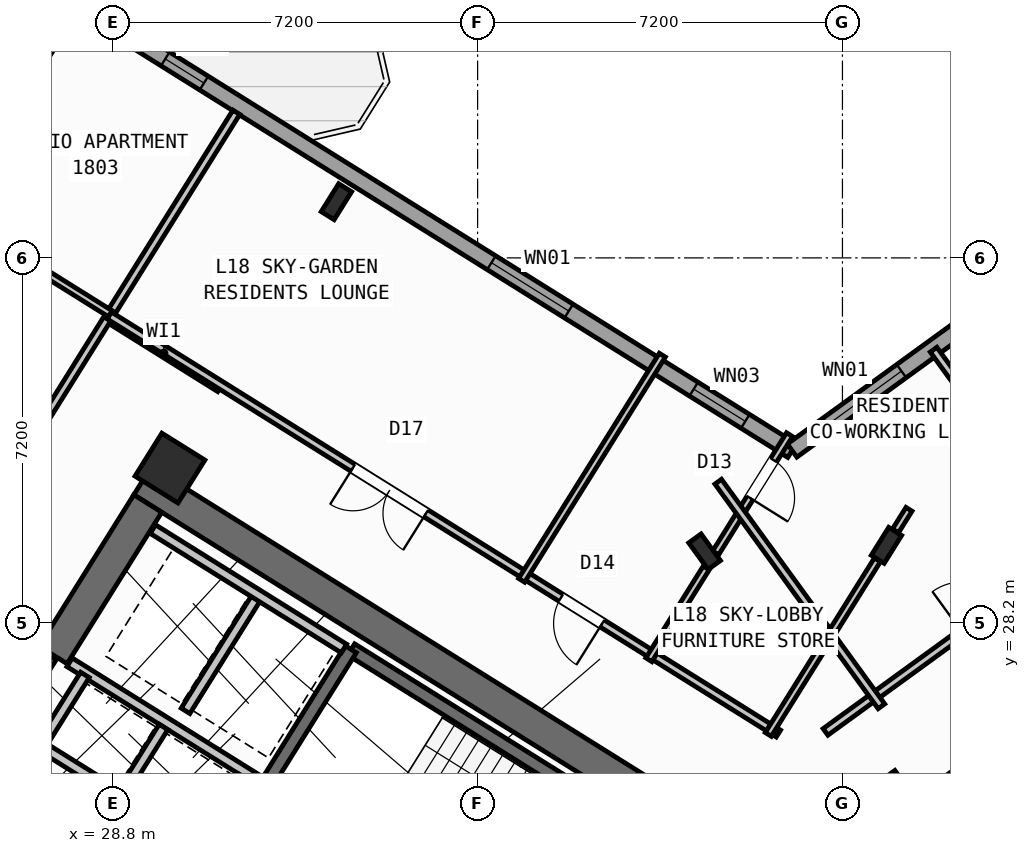
"""IFC4 building model, lengths in metres.
Left out: names, types, materials, properties, quantities, classifications, styles, units other than length and angle.
Written with IfcOpenShell. Run it as: python <this file> out.ifc"""

import sys

from ifc_helpers import new_model, si_unit, direction, frame, frame_2d, origin, origin_2d, place, context, subcontext, project, spatial, rectangle, hollow_rectangle, i_section, extrude, source, transform, mapped, element, fill, save


model = new_model("IFC4")
c1 = context("Model", 3, precision=1e-05, world=origin(), true_north=direction((0.0, 1.0)))
c2 = subcontext(c1, "Body", "Model", "MODEL_VIEW")
j1 = project(units=[si_unit("LENGTHUNIT", "METRE"), si_unit("PLANEANGLEUNIT", "RADIAN")], contexts=[c1])
p1 = place(None, origin())
s1 = spatial("IfcSite", under=j1, at=p1, CompositionType="ELEMENT")
p2 = place(p1, origin())
s2 = spatial("IfcBuilding", under=s1, at=p2, CompositionType="ELEMENT")
p3 = place(p2, frame((0.0, 0.0, 71.7)))
s3 = spatial("IfcBuildingStorey", under=s2, at=p3, CompositionType="ELEMENT", Elevation=71.7)
p4 = place(p3, frame((40.615, 23.983, 0.0), z_axis=(0.0, 0.0, 1.0), x_axis=(-0.848045953968, 0.529922692436, 0.0)))
e1 = element("IfcWall", 1, at=p4, inside=s3, PredefinedType="SHEAR", context=c2, shape_type="SweptSolid", body=[
    extrude(rectangle(XDim=13.24, YDim=0.65, at=frame_2d((6.62, 0.0))), origin(), (0.0, 0.0, 1.0), 4.52),
])
p5 = place(p3, frame((29.491, 30.552, 0.0), z_axis=(0.0, 0.0, 1.0), x_axis=(-0.529893103397, -0.8480644427, 0.0)))
e2 = element("IfcWall", 2, at=p5, inside=s3, PredefinedType="SHEAR", context=c2, shape_type="SweptSolid", body=[
    extrude(rectangle(XDim=3.525, YDim=0.65, at=frame_2d((1.763, 0.0))), origin(), (0.0, 0.0, 1.0), 4.52),
])
p6 = place(p3, frame((44.325, 24.113, 0.0), z_axis=(0.0, 0.0, 1.0), x_axis=(0.809012664862, 0.58779121131, 0.0)))
e3 = element("IfcWall", 3, at=p6, inside=s3, PredefinedType="SHEAR", context=c2, shape_type="SweptSolid", body=[
    extrude(rectangle(XDim=12.44, YDim=0.65, at=frame_2d((6.22, 0.0))), origin(), (0.0, 0.0, 1.0), 4.52),
])
m1 = source(origin(), c2, "Body", "SweptSolid", [
    extrude(i_section(OverallWidth=0.3, OverallDepth=0.65, WebThickness=0.016, FlangeThickness=0.031, at=origin_2d()), origin(), (0.0, 0.0, 1.0), 4.8),
])
for number, where, z_axis, x_axis in (
    (4, (44.068, 29.726, 0.0), (0.0, 0.0, 1.0), (-0.848, 0.53, 0.0)),
    (5, (33.213, 36.509, 0.0), (0.0, 0.0, 1.0), (-0.848, 0.53, 0.0)),
):
    element("IfcColumn", number, at=place(p3, frame(where, z_axis=z_axis, x_axis=x_axis)), inside=s3, PredefinedType="COLUMN", context=c2, shape_type="MappedRepresentation", body=[
        mapped(m1, transform((0.0, 0.0, 0.0), scale=1.0)),
    ])
m2 = source(origin(), c2, "Body", "SweptSolid", [
    extrude(hollow_rectangle(XDim=1.0, YDim=1.0, WallThickness=0.04, at=origin_2d()), origin(), (0.0, 0.0, 1.0), 4.8),
])
for number, where, z_axis, x_axis in (
    (6, (29.928, 31.251, 0.0), (0.0, 0.0, 1.0), (-0.848, 0.53, 0.0)),
    (7, (44.124, 24.585, 0.0), (0.0, 0.0, 1.0), (0.809, 0.588, 0.0)),
):
    element("IfcColumn", number, at=place(p3, frame(where, z_axis=z_axis, x_axis=x_axis)), inside=s3, PredefinedType="COLUMN", context=c2, shape_type="MappedRepresentation", body=[
        mapped(m2, transform((0.0, 0.0, 0.0), scale=1.0)),
    ])
p7 = place(p3, frame((40.479, 29.601, 0.0), z_axis=(0.0, 0.0, 1.0), x_axis=(0.809016994375, 0.587785252292, 0.0)))
e8 = element("IfcColumn", 8, at=p7, inside=s3, PredefinedType="COLUMN", context=c2, shape_type="MappedRepresentation", body=[
    mapped(m1, transform((0.0, 0.0, 0.0), scale=1.0)),
])
p8 = place(p3, frame((31.76, 12.183, 0.0), z_axis=(0.0, 0.0, 1.0), x_axis=(-0.848047074256, 0.529920899612, 0.0)))
e9 = element("IfcWall", 9, at=p8, inside=s3, PredefinedType="STANDARD", context=c2, shape_type="SweptSolid", body=[
    extrude(rectangle(XDim=30.652, YDim=0.32, at=frame_2d((15.326, 0.0))), origin(), (0.0, 0.0, 1.0), 4.52),
])
p9 = place(p8, frame((20.241, 0.0, 0.0)))
e10 = element("IfcOpeningElement", 10, at=p9, cuts=e9, PredefinedType="OPENING", context=c2, shape_type="SweptSolid", body=[
    extrude(rectangle(XDim=1.2, YDim=2.15, at=frame_2d((0.6, 1.075))), frame((0.0, 0.17, 0.0), z_axis=(0.0, -1.0, 0.0), x_axis=(1.0, 0.0, 0.0)), (0.0, 0.0, 1.0), 0.34),
])
p10 = place(p8, frame((14.781, 0.0, 0.0)))
e11 = element("IfcOpeningElement", 11, at=p10, cuts=e9, PredefinedType="OPENING", context=c2, shape_type="SweptSolid", body=[
    extrude(rectangle(XDim=1.5, YDim=2.25, at=frame_2d((0.75, 1.125))), frame((0.0, 0.17, 0.0), z_axis=(0.0, -1.0, 0.0), x_axis=(1.0, 0.0, 0.0)), (0.0, 0.0, 1.0), 0.34),
])
p11 = place(p8, frame((1.84, 0.0, 0.75)))
e12 = element("IfcOpeningElement", 12, at=p11, cuts=e9, PredefinedType="OPENING", context=c2, shape_type="SweptSolid", body=[
    extrude(rectangle(XDim=2.4, YDim=1.6, at=frame_2d((1.2, 0.8))), frame((0.0, 0.17, 0.0), z_axis=(0.0, -1.0, 0.0), x_axis=(1.0, 0.0, 0.0)), (0.0, 0.0, 1.0), 0.34),
])
p12 = place(p8, frame((7.019, 0.0, 0.75)))
e13 = element("IfcOpeningElement", 13, at=p12, cuts=e9, PredefinedType="OPENING", context=c2, shape_type="SweptSolid", body=[
    extrude(rectangle(XDim=2.4, YDim=1.6, at=frame_2d((1.2, 0.8))), frame((0.0, 0.17, 0.0), z_axis=(0.0, -1.0, 0.0), x_axis=(1.0, 0.0, 0.0)), (0.0, 0.0, 1.0), 0.34),
])
p13 = place(p8, frame((25.841, 0.0, 0.95)))
e14 = element("IfcOpeningElement", 14, at=p13, cuts=e9, PredefinedType="OPENING", context=c2, shape_type="SweptSolid", body=[
    extrude(rectangle(XDim=1.2, YDim=1.4, at=frame_2d((0.6, 0.7))), frame((0.0, 0.17, 0.0), z_axis=(0.0, -1.0, 0.0), x_axis=(1.0, 0.0, 0.0)), (0.0, 0.0, 1.0), 0.34),
])
p14 = place(p3, frame((17.424, 47.083, 0.0), z_axis=(0.0, 0.0, 1.0), x_axis=(0.848049927979, -0.529916332693, 0.0)))
e15 = element("IfcWall", 15, at=p14, inside=s3, PredefinedType="STANDARD", context=c2, shape_type="SweptSolid", body=[
    extrude(rectangle(XDim=29.223, YDim=0.32, at=frame_2d((14.612, 0.0))), origin(), (0.0, 0.0, 1.0), 4.52),
])
p15 = place(p14, frame((3.339, 0.0, 0.0)))
e16 = element("IfcOpeningElement", 16, at=p15, cuts=e15, PredefinedType="OPENING", context=c2, shape_type="SweptSolid", body=[
    extrude(rectangle(XDim=1.05, YDim=2.15, at=frame_2d((0.525, 1.075))), frame((0.0, 0.17, 0.0), z_axis=(0.0, -1.0, 0.0), x_axis=(1.0, 0.0, 0.0)), (0.0, 0.0, 1.0), 0.34),
])
p16 = place(p14, frame((8.194, 0.0, 0.75)))
e17 = element("IfcOpeningElement", 17, at=p16, cuts=e15, PredefinedType="OPENING", context=c2, shape_type="SweptSolid", body=[
    extrude(rectangle(XDim=2.4, YDim=1.6, at=frame_2d((1.2, 0.8))), frame((0.0, 0.17, 0.0), z_axis=(0.0, -1.0, 0.0), x_axis=(1.0, 0.0, 0.0)), (0.0, 0.0, 1.0), 0.34),
])
p17 = place(p14, frame((22.226, 0.0, 0.85)))
e18 = element("IfcOpeningElement", 18, at=p17, cuts=e15, PredefinedType="OPENING", context=c2, shape_type="SweptSolid", body=[
    extrude(rectangle(XDim=1.8, YDim=1.5, at=frame_2d((0.9, 0.75))), frame((0.0, 0.17, 0.0), z_axis=(0.0, -1.0, 0.0), x_axis=(1.0, 0.0, 0.0)), (0.0, 0.0, 1.0), 0.34),
])
p18 = place(p14, frame((26.934, 0.0, 0.95)))
e19 = element("IfcOpeningElement", 19, at=p18, cuts=e15, PredefinedType="OPENING", context=c2, shape_type="SweptSolid", body=[
    extrude(rectangle(XDim=1.2, YDim=1.4, at=frame_2d((0.6, 0.7))), frame((0.0, 0.17, 0.0), z_axis=(0.0, -1.0, 0.0), x_axis=(1.0, 0.0, 0.0)), (0.0, 0.0, 1.0), 0.34),
])
p19 = place(p14, frame((14.636, 0.0, 1.0)))
e20 = element("IfcOpeningElement", 20, at=p19, cuts=e15, PredefinedType="OPENING", context=c2, shape_type="SweptSolid", body=[
    extrude(rectangle(XDim=0.9, YDim=1.25, at=frame_2d((0.45, 0.625))), frame((0.0, 0.17, 0.0), z_axis=(0.0, -1.0, 0.0), x_axis=(1.0, 0.0, 0.0)), (0.0, 0.0, 1.0), 0.34),
])
p20 = place(p3, frame((42.207, 31.597, 0.0), z_axis=(0.0, 0.0, 1.0), x_axis=(0.809020333377, 0.587780656523, 0.0)))
e21 = element("IfcWall", 21, at=p20, inside=s3, PredefinedType="STANDARD", context=c2, shape_type="SweptSolid", body=[
    extrude(rectangle(XDim=15.223, YDim=0.32, at=frame_2d((7.611, 0.0))), origin(), (0.0, 0.0, 1.0), 4.52),
])
p21 = place(p20, frame((12.562, 0.0, 0.0)))
e22 = element("IfcOpeningElement", 22, at=p21, cuts=e21, PredefinedType="OPENING", context=c2, shape_type="SweptSolid", body=[
    extrude(rectangle(XDim=1.05, YDim=2.15, at=frame_2d((0.525, 1.075))), frame((0.0, 0.17, 0.0), z_axis=(0.0, -1.0, 0.0), x_axis=(1.0, 0.0, 0.0)), (0.0, 0.0, 1.0), 0.34),
])
p22 = place(p20, frame((0.868, 0.0, 0.85)))
e23 = element("IfcOpeningElement", 23, at=p22, cuts=e21, PredefinedType="OPENING", context=c2, shape_type="SweptSolid", body=[
    extrude(rectangle(XDim=1.8, YDim=1.5, at=frame_2d((0.9, 0.75))), frame((0.0, 0.17, 0.0), z_axis=(0.0, -1.0, 0.0), x_axis=(1.0, 0.0, 0.0)), (0.0, 0.0, 1.0), 0.34),
])
p23 = place(p20, frame((4.932, 0.0, 0.85)))
e24 = element("IfcOpeningElement", 24, at=p23, cuts=e21, PredefinedType="OPENING", context=c2, shape_type="SweptSolid", body=[
    extrude(rectangle(XDim=1.8, YDim=1.5, at=frame_2d((0.9, 0.75))), frame((0.0, 0.17, 0.0), z_axis=(0.0, -1.0, 0.0), x_axis=(1.0, 0.0, 0.0)), (0.0, 0.0, 1.0), 0.34),
])
p24 = place(p3, frame((39.721, 23.788, 0.0), z_axis=(0.0, 0.0, 1.0), x_axis=(-0.848054434086, 0.529909121291, 0.0)))
e25 = element("IfcWall", 25, at=p24, inside=s3, PredefinedType="SHEAR", context=c2, shape_type="SweptSolid", body=[
    extrude(rectangle(XDim=7.33, YDim=0.26, at=frame_2d((3.665, 0.0))), origin(), (0.0, 0.0, 1.0), 4.52),
])
p25 = place(p3, frame((33.496, 27.677, 0.0), z_axis=(0.0, 0.0, 1.0), x_axis=(-0.529908658664, -0.84805472316, 0.0)))
e26 = element("IfcWall", 26, at=p25, inside=s3, PredefinedType="SHEAR", context=c2, shape_type="SweptSolid", body=[
    extrude(rectangle(XDim=3.16, YDim=0.26, at=frame_2d((1.58, 0.0))), origin(), (0.0, 0.0, 1.0), 4.52),
])
p26 = place(p3, frame((31.822, 24.998, 0.0), z_axis=(0.0, 0.0, 1.0), x_axis=(-0.848058348634, 0.529902856485, 0.0)))
e27 = element("IfcWall", 27, at=p26, inside=s3, PredefinedType="STANDARD", context=c2, shape_type="SweptSolid", body=[
    extrude(rectangle(XDim=4.568, YDim=0.2, at=frame_2d((2.284, 0.0))), origin(), (0.0, 0.0, 1.0), 4.51),
])
p27 = place(p3, frame((32.108, 22.814, 0.0), z_axis=(0.0, 0.0, 1.0), x_axis=(-0.848042229521, 0.529928652696, 0.0)))
e28 = element("IfcWall", 28, at=p27, inside=s3, PredefinedType="STANDARD", context=c2, shape_type="SweptSolid", body=[
    extrude(rectangle(XDim=5.62, YDim=0.2, at=frame_2d((2.81, 0.0))), origin(), (0.0, 0.0, 1.0), 4.51),
])
p28 = place(p3, frame((28.25, 27.17, 0.0), z_axis=(0.0, 0.0, 1.0), x_axis=(-0.529905827651, -0.848056492117, 0.0)))
e29 = element("IfcWall", 29, at=p28, inside=s3, PredefinedType="STANDARD", context=c2, shape_type="SweptSolid", body=[
    extrude(rectangle(XDim=1.65, YDim=0.2, at=frame_2d((0.825, 0.0))), origin(), (0.0, 0.0, 1.0), 4.51),
])
p29 = place(p3, frame((31.645, 28.716, 0.0), z_axis=(0.0, 0.0, 1.0), x_axis=(-0.52986693015, -0.848080795876, 0.0)))
e30 = element("IfcWall", 30, at=p29, inside=s3, PredefinedType="STANDARD", context=c2, shape_type="SweptSolid", body=[
    extrude(rectangle(XDim=2.66, YDim=0.2, at=frame_2d((1.33, 0.0))), origin(), (0.0, 0.0, 1.0), 4.51),
])
p30 = place(p3, frame((33.363, 27.69, 0.0), z_axis=(0.0, 0.0, 1.0), x_axis=(-0.848053806312, 0.529910125964, 0.0)))
e31 = element("IfcWall", 31, at=p30, inside=s3, PredefinedType="STANDARD", context=c2, shape_type="SweptSolid", body=[
    extrude(rectangle(XDim=4.448, YDim=0.2, at=frame_2d((2.224, 0.0))), origin(), (0.0, 0.0, 1.0), 4.51),
])
p31 = place(p3, frame((29.801, 26.142, 0.0), z_axis=(0.0, 0.0, 1.0), x_axis=(-0.529998940003, -0.847998304005, 0.0)))
e32 = element("IfcWall", 32, at=p31, inside=s3, PredefinedType="STANDARD", context=c2, shape_type="SweptSolid", body=[
    extrude(rectangle(XDim=1.58, YDim=0.2, at=frame_2d((0.79, 0.0))), origin(), (0.0, 0.0, 1.0), 4.51),
])
p32 = place(p3, frame((27.596, 27.52, 0.0), z_axis=(0.0, 0.0, 1.0), x_axis=(-0.529865479138, -0.848081702443, 0.0)))
e33 = element("IfcWall", 33, at=p32, inside=s3, PredefinedType="STANDARD", context=c2, shape_type="SweptSolid", body=[
    extrude(rectangle(XDim=2.96, YDim=0.2, at=frame_2d((1.48, 0.0))), origin(), (0.0, 0.0, 1.0), 4.51),
])
p33 = place(p32, frame((1.76, 0.0, 0.0)))
e34 = element("IfcOpeningElement", 34, at=p33, cuts=e33, PredefinedType="OPENING", context=c2, shape_type="SweptSolid", body=[
    extrude(rectangle(XDim=0.86, YDim=2.05, at=frame_2d((0.43, 1.025))), frame((0.0, 0.11, 0.0), z_axis=(0.0, -1.0, 0.0), x_axis=(1.0, 0.0, 0.0)), (0.0, 0.0, 1.0), 0.22),
])
p34 = place(p3, frame((30.914, 32.829, 0.0), z_axis=(0.0, 0.0, 1.0), x_axis=(-0.848008813643, 0.529982124211, 0.0)))
e35 = element("IfcWall", 35, at=p34, inside=s3, PredefinedType="PARTITIONING", context=c2, shape_type="SweptSolid", body=[
    extrude(rectangle(XDim=2.61, YDim=0.16, at=frame_2d((1.305, 0.0))), origin(), (0.0, 0.0, 1.0), 4.51),
])
p35 = place(p3, frame((31.239, 38.274, 0.0), z_axis=(0.0, 0.0, 1.0), x_axis=(-0.529920220799, -0.848047498427, 0.0)))
e36 = element("IfcWall", 36, at=p35, inside=s3, PredefinedType="PARTITIONING", context=c2, shape_type="SweptSolid", body=[
    extrude(rectangle(XDim=9.2, YDim=0.16, at=frame_2d((4.6, 0.0))), origin(), (0.0, 0.0, 1.0), 4.51),
])
p36 = place(p3, frame((27.607, 39.615, 0.0), z_axis=(0.0, 0.0, 1.0), x_axis=(-0.529937421401, -0.848036750028, 0.0)))
e37 = element("IfcWall", 37, at=p36, inside=s3, PredefinedType="PARTITIONING", context=c2, shape_type="SweptSolid", body=[
    extrude(rectangle(XDim=5.351, YDim=0.16, at=frame_2d((2.676, 0.0))), origin(), (0.0, 0.0, 1.0), 3.895),
])
p37 = place(p3, frame((28.753, 34.297, 0.0), z_axis=(0.0, 0.0, 1.0), x_axis=(-0.848059820872, 0.529900500304, 0.0)))
e38 = element("IfcWall", 38, at=p37, inside=s3, PredefinedType="PLUMBINGWALL", context=c2, shape_type="SweptSolid", body=[
    extrude(rectangle(XDim=3.79, YDim=0.14, at=frame_2d((1.895, 0.0))), origin(), (0.0, 0.0, 1.0), 4.51),
])
p38 = place(p37, frame((1.87, 0.0, 0.0)))
e39 = element("IfcOpeningElement", 39, at=p38, cuts=e38, PredefinedType="OPENING", context=c2, shape_type="SweptSolid", body=[
    extrude(rectangle(XDim=0.78, YDim=2.05, at=frame_2d((0.39, 1.025))), frame((0.0, 0.08, 0.0), z_axis=(0.0, -1.0, 0.0), x_axis=(1.0, 0.0, 0.0)), (0.0, 0.0, 1.0), 0.16),
])
p39 = place(p3, frame((41.936, 26.012, 0.0), z_axis=(0.0, 0.0, 1.0), x_axis=(-0.848051154596, 0.529914369676, 0.0)))
e40 = element("IfcWall", 40, at=p39, inside=s3, PredefinedType="PARTITIONING", context=c2, shape_type="SweptSolid", body=[
    extrude(rectangle(XDim=15.57, YDim=0.16, at=frame_2d((7.785, 0.0))), origin(), (0.0, 0.0, 1.0), 4.51),
])
p40 = place(p39, frame((4.1, 0.0, 0.0)))
e41 = element("IfcOpeningElement", 41, at=p40, cuts=e40, PredefinedType="OPENING", context=c2, shape_type="SweptSolid", body=[
    extrude(rectangle(XDim=0.96, YDim=2.08, at=frame_2d((0.48, 1.04))), frame((0.0, 0.09, 0.0), z_axis=(0.0, -1.0, 0.0), x_axis=(1.0, 0.0, 0.0)), (0.0, 0.0, 1.0), 0.18),
])
p41 = place(p39, frame((8.2, 0.0, 0.0)))
e42 = element("IfcOpeningElement", 42, at=p41, cuts=e40, PredefinedType="OPENING", context=c2, shape_type="SweptSolid", body=[
    extrude(rectangle(XDim=1.7, YDim=2.2, at=frame_2d((0.85, 1.1))), frame((0.0, 0.09, 0.0), z_axis=(0.0, -1.0, 0.0), x_axis=(1.0, 0.0, 0.0)), (0.0, 0.0, 1.0), 0.18),
])
p42 = place(p3, frame((42.156, 31.912, 0.0), z_axis=(0.0, 0.0, 1.0), x_axis=(-0.529943141103, -0.848033175765, 0.0)))
e43 = element("IfcWall", 43, at=p42, inside=s3, PredefinedType="PLUMBINGWALL", context=c2, shape_type="SweptSolid", body=[
    extrude(rectangle(XDim=2.753, YDim=0.14, at=frame_2d((1.376, 0.0))), origin(), (0.0, 0.0, 1.0), 4.005),
])
p43 = place(p42, frame((0.593, 0.0, 0.0)))
e44 = element("IfcOpeningElement", 44, at=p43, cuts=e43, PredefinedType="OPENING", context=c2, shape_type="SweptSolid", body=[
    extrude(rectangle(XDim=0.88, YDim=2.08, at=frame_2d((0.44, 1.04))), frame((0.0, 0.08, 0.0), z_axis=(0.0, -1.0, 0.0), x_axis=(1.0, 0.0, 0.0)), (0.0, 0.0, 1.0), 0.16),
])
p44 = place(p3, frame((40.512, 29.281, 0.0), z_axis=(0.0, 0.0, 1.0), x_axis=(-0.529947607416, -0.848030384712, 0.0)))
e45 = element("IfcWall", 45, at=p44, inside=s3, PredefinedType="PLUMBINGWALL", context=c2, shape_type="SweptSolid", body=[
    extrude(rectangle(XDim=2.138, YDim=0.14, at=frame_2d((1.069, 0.0))), origin(), (0.0, 0.0, 1.0), 4.51),
])
p45 = place(p3, frame((44.514, 30.439, 0.0), z_axis=(0.0, 0.0, 1.0), x_axis=(-0.529824479439, -0.848107316905, 0.0)))
e46 = element("IfcWall", 46, at=p45, inside=s3, PredefinedType="PLUMBINGWALL", context=c2, shape_type="SweptSolid", body=[
    extrude(rectangle(XDim=0.503, YDim=0.14, at=frame_2d((0.251, 0.0))), origin(), (0.0, 0.0, 1.0), 4.51),
])
p46 = place(p3, frame((43.89, 29.44, 0.0), z_axis=(0.0, 0.0, 1.0), x_axis=(-0.529928721319, -0.84804218664, 0.0)))
e47 = element("IfcWall", 47, at=p46, inside=s3, PredefinedType="PLUMBINGWALL", context=c2, shape_type="SweptSolid", body=[
    extrude(rectangle(XDim=4.063, YDim=0.14, at=frame_2d((2.031, 0.0))), origin(), (0.0, 0.0, 1.0), 3.895),
])
p47 = place(p3, frame((39.646, 33.48, 0.0), z_axis=(0.0, 0.0, 1.0), x_axis=(-0.529923555071, -0.848045414928, 0.0)))
e48 = element("IfcWall", 48, at=p47, inside=s3, PredefinedType="PLUMBINGWALL", context=c2, shape_type="SweptSolid", body=[
    extrude(rectangle(XDim=5.24, YDim=0.14, at=frame_2d((2.62, 0.0))), origin(), (0.0, 0.0, 1.0), 4.51),
])
p48 = place(p3, frame((42.866, 26.044, 0.0), z_axis=(0.0, 0.0, 1.0), x_axis=(0.809020254154, 0.587780765566, 0.0)))
e49 = element("IfcWall", 49, at=p48, inside=s3, PredefinedType="PARTITIONING", context=c2, shape_type="SweptSolid", body=[
    extrude(rectangle(XDim=14.67, YDim=0.16, at=frame_2d((7.335, 0.0))), origin(), (0.0, 0.0, 1.0), 4.51),
])
p49 = place(p48, frame((3.335, 0.0, 0.0)))
e50 = element("IfcOpeningElement", 50, at=p49, cuts=e49, PredefinedType="OPENING", context=c2, shape_type="SweptSolid", body=[
    extrude(rectangle(XDim=1.0, YDim=2.1, at=frame_2d((0.5, 1.05))), frame((0.0, 0.09, 0.0), z_axis=(0.0, -1.0, 0.0), x_axis=(1.0, 0.0, 0.0)), (0.0, 0.0, 1.0), 0.18),
])
p50 = place(p48, frame((9.915, 0.0, 0.0)))
e51 = element("IfcOpeningElement", 51, at=p50, cuts=e49, PredefinedType="OPENING", context=c2, shape_type="SweptSolid", body=[
    extrude(rectangle(XDim=1.0, YDim=2.1, at=frame_2d((0.5, 1.05))), frame((0.0, 0.09, 0.0), z_axis=(0.0, -1.0, 0.0), x_axis=(1.0, 0.0, 0.0)), (0.0, 0.0, 1.0), 0.18),
])
p51 = place(p3, frame((43.969, 26.55, 0.0), z_axis=(0.0, 0.0, 1.0), x_axis=(-0.587776919386, 0.80902304852, 0.0)))
e52 = element("IfcWall", 52, at=p51, inside=s3, PredefinedType="PARTITIONING", context=c2, shape_type="SweptSolid", body=[
    extrude(rectangle(XDim=5.48, YDim=0.16, at=frame_2d((2.74, 0.0))), origin(), (0.0, 0.0, 1.0), 4.51),
])
p52 = place(p3, frame((47.849, 29.665, 0.0), z_axis=(0.0, 0.0, 1.0), x_axis=(-0.587785532001, 0.809016791155, 0.0)))
e53 = element("IfcWall", 53, at=p52, inside=s3, PredefinedType="PARTITIONING", context=c2, shape_type="SweptSolid", body=[
    extrude(rectangle(XDim=4.85, YDim=0.16, at=frame_2d((2.425, 0.0))), origin(), (0.0, 0.0, 1.0), 4.51),
])
m3 = source(origin(), c2, "Body", "SweptSolid", [
    extrude(rectangle(XDim=1.8, YDim=1.5, at=frame_2d((0.9, 0.75))), frame((0.0, 0.03, 0.0), z_axis=(0.0, -1.0, 0.0), x_axis=(1.0, 0.0, 0.0)), (0.0, 0.0, 1.0), 0.06),
])
p53 = place(p17, origin())
e54 = element("IfcWindow", 54, at=p53, inside=s3, PartitioningType="SINGLE_PANEL", PredefinedType="WINDOW", context=c2, shape_type="MappedRepresentation", body=[
    mapped(m3, transform((0.0, 0.0, 0.0), scale=1.0)),
])
fill(e18, e54)
m4 = source(origin(), c2, "Body", "SweptSolid", [
    extrude(rectangle(XDim=1.2, YDim=1.4, at=frame_2d((0.6, 0.7))), frame((0.0, 0.03, 0.0), z_axis=(0.0, -1.0, 0.0), x_axis=(1.0, 0.0, 0.0)), (0.0, 0.0, 1.0), 0.06),
])
p54 = place(p18, origin())
e55 = element("IfcWindow", 55, at=p54, inside=s3, PartitioningType="SINGLE_PANEL", PredefinedType="WINDOW", context=c2, shape_type="MappedRepresentation", body=[
    mapped(m4, transform((0.0, 0.0, 0.0), scale=1.0)),
])
fill(e19, e55)
p55 = place(p22, origin())
e56 = element("IfcWindow", 56, at=p55, inside=s3, PartitioningType="SINGLE_PANEL", PredefinedType="WINDOW", context=c2, shape_type="MappedRepresentation", body=[
    mapped(m3, transform((0.0, 0.0, 0.0), scale=1.0)),
])
fill(e23, e56)
m5 = source(origin(), c2, "Body", "SweptSolid", [
    extrude(rectangle(XDim=0.9, YDim=1.25, at=frame_2d((0.45, 0.625))), frame((0.0, 0.03, 0.0), z_axis=(0.0, -1.0, 0.0), x_axis=(1.0, 0.0, 0.0)), (0.0, 0.0, 1.0), 0.06),
])
p56 = place(p19, origin())
e57 = element("IfcWindow", 57, at=p56, inside=s3, PartitioningType="SINGLE_PANEL", PredefinedType="WINDOW", context=c2, shape_type="MappedRepresentation", body=[
    mapped(m5, transform((0.0, 0.0, 0.0), scale=1.0)),
])
fill(e20, e57)
m6 = source(origin(), c2, "Body", "SweptSolid", [
    extrude(rectangle(XDim=0.88, YDim=2.08, at=frame_2d((0.44, 1.04))), frame((0.0, 0.025, 0.0), z_axis=(0.0, -1.0, 0.0), x_axis=(1.0, 0.0, 0.0)), (0.0, 0.0, 1.0), 0.05),
])
p57 = place(p43, origin())
e58 = element("IfcDoor", 58, at=p57, inside=s3, OperationType="SINGLE_SWING_RIGHT", PredefinedType="DOOR", context=c2, shape_type="MappedRepresentation", body=[
    mapped(m6, transform((0.0, 0.0, 0.0), scale=1.0)),
])
fill(e44, e58)
m7 = source(origin(), c2, "Body", "SweptSolid", [
    extrude(rectangle(XDim=0.96, YDim=2.08, at=frame_2d((0.48, 1.04))), frame((0.0, 0.025, 0.0), z_axis=(0.0, -1.0, 0.0), x_axis=(1.0, 0.0, 0.0)), (0.0, 0.0, 1.0), 0.05),
])
p58 = place(p40, origin())
e59 = element("IfcDoor", 59, at=p58, inside=s3, OperationType="SINGLE_SWING_LEFT", PredefinedType="DOOR", context=c2, shape_type="MappedRepresentation", body=[
    mapped(m7, transform((0.0, 0.0, 0.0), scale=1.0)),
])
fill(e41, e59)
m8 = source(origin(), c2, "Body", "SweptSolid", [
    extrude(rectangle(XDim=1.7, YDim=2.2, at=frame_2d((0.85, 1.1))), frame((0.0, 0.025, 0.0), z_axis=(0.0, -1.0, 0.0), x_axis=(1.0, 0.0, 0.0)), (0.0, 0.0, 1.0), 0.05),
])
p59 = place(p41, origin())
e60 = element("IfcDoor", 60, at=p59, inside=s3, OperationType="DOUBLE_DOOR_SINGLE_SWING", PredefinedType="DOOR", context=c2, shape_type="MappedRepresentation", body=[
    mapped(m8, transform((0.0, 0.0, 0.0), scale=1.0)),
])
fill(e42, e60)
save(model, sys.argv[1])
